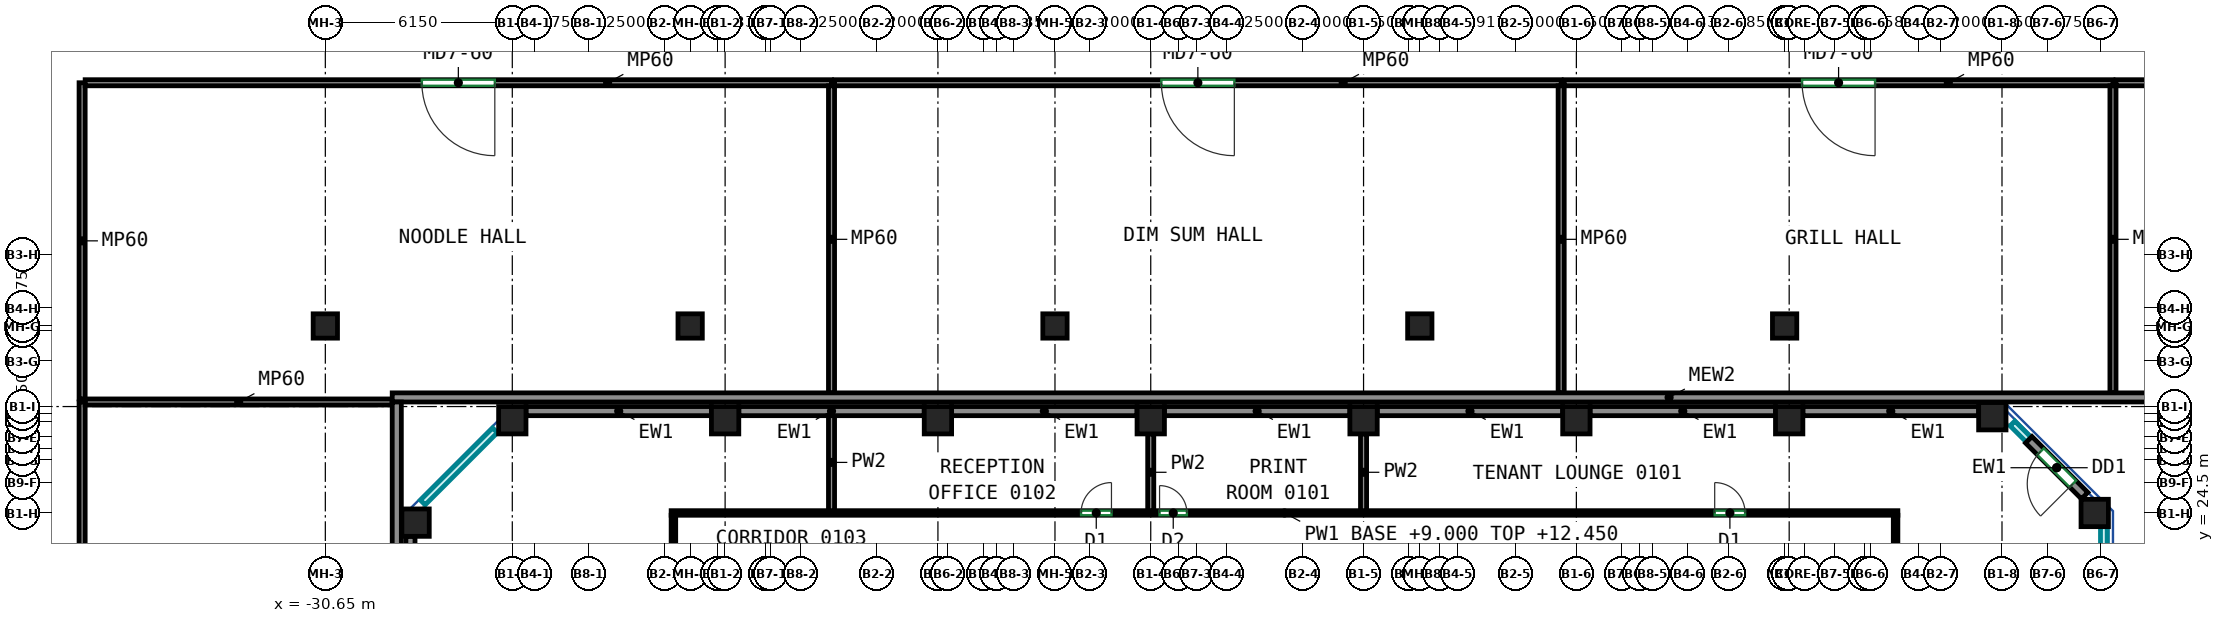
"""IFC4 building model, lengths in metres.
Left out: names, types, materials, properties, quantities, classifications, styles, units other than length and angle.
Written with IfcOpenShell. Run it as: python <this file> out.ifc"""

import sys

from ifc_helpers import new_model, si_unit, direction, frame, frame_2d, origin, origin_2d, place, context, subcontext, project, spatial, rectangle, extrude, source, transform, mapped, element, fill, save


model = new_model("IFC4")
c1 = context("Model", 3, precision=1e-05, world=origin(), true_north=direction((0.0, 1.0)))
c2 = subcontext(c1, "Body", "Model", "MODEL_VIEW")
j1 = project(units=[si_unit("LENGTHUNIT", "METRE"), si_unit("PLANEANGLEUNIT", "RADIAN")], contexts=[c1])
p1 = place(None, origin())
s1 = spatial("IfcSite", under=j1, at=p1, CompositionType="ELEMENT")
p2 = place(p1, origin())
s2 = spatial("IfcBuilding", under=s1, at=p2, CompositionType="ELEMENT")
p3 = place(p2, frame((0.0, 0.0, 9.0)))
s3 = spatial("IfcBuildingStorey", under=s2, at=p3, CompositionType="ELEMENT", Elevation=9.0)
m1 = source(origin(), c2, "Body", "SweptSolid", [
    extrude(rectangle(XDim=0.9, YDim=0.9, at=origin_2d()), origin(), (0.0, 0.0, 1.0), 4.1),
])
for number, where, z_axis, x_axis in (
    (1, (-27.682, 24.182, 0.0), (0.0, 0.0, 1.0), (1.0, 0.0, 0.0)),
    (2, (-24.5, 27.55, 0.0), (0.0, 0.0, 1.0), (1.0, 0.0, 0.0)),
    (3, (-17.5, 27.55, 0.0), (0.0, 0.0, 1.0), (1.0, 0.0, 0.0)),
    (4, (-10.5, 27.55, 0.0), (0.0, 0.0, 1.0), (1.0, 0.0, 0.0)),
    (5, (-3.5, 27.55, 0.0), (0.0, 0.0, 1.0), (1.0, 0.0, 0.0)),
    (6, (3.5, 27.55, 0.0), (0.0, 0.0, 1.0), (1.0, 0.0, 0.0)),
    (7, (10.5, 27.55, 0.0), (0.0, 0.0, 1.0), (1.0, 0.0, 0.0)),
    (8, (17.5, 27.55, 0.0), (0.0, 0.0, 1.0), (1.0, 0.0, 0.0)),
    (9, (24.182, 27.682, 0.0), (0.0, 0.0, 1.0), (1.0, 0.0, 0.0)),
    (10, (27.55, 24.5, 0.0), (0.0, 0.0, 1.0), (1.0, 0.0, 0.0)),
):
    element("IfcColumn", number, at=place(p3, frame(where, z_axis=z_axis, x_axis=x_axis)), inside=s3, PredefinedType="COLUMN", context=c2, shape_type="MappedRepresentation", body=[
        mapped(m1, transform((0.0, 0.0, 0.0))),
    ])
m2 = source(origin(), c2, "Body", "SweptSolid", [
    extrude(rectangle(XDim=0.8, YDim=0.8, at=origin_2d()), origin(), (0.0, 0.0, 1.0), 4.1),
])
for number, where, z_axis, x_axis in (
    (11, (-30.65, 30.65, 0.0), (0.0, 0.0, 1.0), (1.0, 0.0, 0.0)),
    (12, (-18.65, 30.65, 0.0), (0.0, 0.0, 1.0), (1.0, 0.0, 0.0)),
    (13, (-6.65, 30.65, 0.0), (0.0, 0.0, 1.0), (1.0, 0.0, 0.0)),
    (14, (5.35, 30.65, 0.0), (0.0, 0.0, 1.0), (1.0, 0.0, 0.0)),
    (15, (17.35, 30.65, 0.0), (0.0, 0.0, 1.0), (1.0, 0.0, 0.0)),
):
    element("IfcColumn", number, at=place(p3, frame(where, z_axis=z_axis, x_axis=x_axis)), inside=s3, PredefinedType="COLUMN", context=c2, shape_type="MappedRepresentation", body=[
        mapped(m2, transform((0.0, 0.0, 0.0))),
    ])
m3 = source(origin(), c2, "Body", "SweptSolid", [
    extrude(rectangle(XDim=2.6, YDim=0.3, at=frame_2d((1.3, 0.0))), origin(), (0.0, 0.0, 1.0), 4.1),
])
p4 = place(p3, frame((27.219, 25.069, 0.0), z_axis=(0.0, 0.0, 1.0), x_axis=(-0.707059830104, 0.707153729152, 0.0)))
e16 = element("IfcWall", 16, at=p4, inside=s3, PredefinedType="SOLIDWALL", context=c2, shape_type="MappedRepresentation", body=[
    mapped(m3, transform((0.0, 0.0, 0.0))),
])
p5 = place(p4, frame((0.55, 0.0, 0.0)))
e17 = element("IfcOpeningElement", 17, at=p5, cuts=e16, PredefinedType="OPENING", context=c2, shape_type="SweptSolid", body=[
    extrude(rectangle(XDim=1.5, YDim=2.4, at=frame_2d((0.75, 1.2))), frame((0.0, 0.16, 0.0), z_axis=(0.0, -1.0, 0.0), x_axis=(1.0, 0.0, 0.0)), (0.0, 0.0, 1.0), 0.32),
])
m4 = source(origin(), c2, "Body", "SweptSolid", [
    extrude(rectangle(XDim=5.782, YDim=0.3, at=frame_2d((2.891, 0.0))), origin(), (0.0, 0.0, 1.0), 4.1),
])
p6 = place(p3, frame((23.732, 27.85, 0.0), z_axis=(0.0, 0.0, 1.0), x_axis=(-1.0, 0.0, 0.0)))
e18 = element("IfcWall", 18, at=p6, inside=s3, PredefinedType="SOLIDWALL", context=c2, shape_type="MappedRepresentation", body=[
    mapped(m4, transform((0.0, 0.0, 0.0))),
])
m5 = source(origin(), c2, "Body", "SweptSolid", [
    extrude(rectangle(XDim=6.1, YDim=0.3, at=frame_2d((3.05, 0.0))), origin(), (0.0, 0.0, 1.0), 4.1),
])
for number, where, z_axis, x_axis in (
    (19, (17.05, 27.85, 0.0), (0.0, 0.0, 1.0), (-1.0, 0.0, 0.0)),
    (20, (10.05, 27.85, 0.0), (0.0, 0.0, 1.0), (-1.0, 0.0, 0.0)),
    (21, (3.05, 27.85, 0.0), (0.0, 0.0, 1.0), (-1.0, 0.0, 0.0)),
    (22, (-3.95, 27.85, 0.0), (0.0, 0.0, 1.0), (-1.0, 0.0, 0.0)),
    (23, (-10.95, 27.85, 0.0), (0.0, 0.0, 1.0), (-1.0, 0.0, 0.0)),
    (24, (-17.95, 27.85, 0.0), (0.0, 0.0, 1.0), (-1.0, 0.0, 0.0)),
):
    element("IfcWall", number, at=place(p3, frame(where, z_axis=z_axis, x_axis=x_axis)), inside=s3, PredefinedType="SOLIDWALL", context=c2, shape_type="MappedRepresentation", body=[
        mapped(m5, transform((0.0, 0.0, 0.0))),
    ])
m6 = source(origin(), c2, "Body", "SweptSolid", [
    extrude(rectangle(XDim=15.282, YDim=0.3, at=frame_2d((7.641, 0.0))), origin(), (0.0, 0.0, 1.0), 4.1),
])
p7 = place(p3, frame((-27.85, 23.732, 0.0), z_axis=(0.0, 0.0, 1.0), x_axis=(0.0, -1.0, 0.0)))
e25 = element("IfcWall", 25, at=p7, inside=s3, PredefinedType="SOLIDWALL", context=c2, shape_type="MappedRepresentation", body=[
    mapped(m6, transform((0.0, 0.0, 0.0))),
])
m7 = source(origin(), c2, "Body", "SweptSolid", [
    extrude(rectangle(XDim=84.0, YDim=0.3, at=frame_2d((42.0, 0.0))), origin(), (0.0, 0.0, 1.0), 4.1),
])
p8 = place(p3, frame((55.55, 28.3, 0.0), z_axis=(0.0, 0.0, 1.0), x_axis=(-1.0, 0.0, 0.0)))
e26 = element("IfcWall", 26, at=p8, inside=s3, PredefinedType="SOLIDWALL", context=c2, shape_type="MappedRepresentation", body=[
    mapped(m7, transform((0.0, 0.0, 0.0))),
])
m8 = source(origin(), c2, "Body", "SweptSolid", [
    extrude(rectangle(XDim=72.0, YDim=0.3, at=frame_2d((36.0, 0.0))), origin(), (0.0, 0.0, 1.0), 4.1),
])
p9 = place(p3, frame((-28.3, 28.15, 0.0), z_axis=(0.0, 0.0, 1.0), x_axis=(0.0, -1.0, 0.0)))
e27 = element("IfcWall", 27, at=p9, inside=s3, PredefinedType="SOLIDWALL", context=c2, shape_type="MappedRepresentation", body=[
    mapped(m8, transform((0.0, 0.0, 0.0))),
])
p10 = place(p3, frame((-19.2, 8.09, 0.0), z_axis=(0.0, 0.0, 1.0), x_axis=(0.0, 1.0, 0.0)))
e28 = element("IfcWall", 28, at=p10, inside=s3, PredefinedType="PARTITIONING", context=c2, shape_type="SweptSolid", body=[
    extrude(rectangle(XDim=16.335, YDim=0.15, at=frame_2d((8.167, 0.0))), origin(), (0.0, 0.0, 1.0), 4.1),
])
p11 = place(p10, frame((4.41, 0.0, 0.0)))
e29 = element("IfcOpeningElement", 29, at=p11, cuts=e28, PredefinedType="OPENING", context=c2, shape_type="SweptSolid", body=[
    extrude(rectangle(XDim=1.8, YDim=2.1, at=frame_2d((0.9, 1.05))), frame((0.0, 0.085, 0.0), z_axis=(0.0, -1.0, 0.0), x_axis=(1.0, 0.0, 0.0)), (0.0, 0.0, 1.0), 0.17),
])
p12 = place(p3, frame((-19.275, 24.5, 0.0), z_axis=(0.0, 0.0, 1.0), x_axis=(1.0, 0.0, 0.0)))
e30 = element("IfcWall", 30, at=p12, inside=s3, PredefinedType="PARTITIONING", context=c2, shape_type="SweptSolid", body=[
    extrude(rectangle(XDim=40.35, YDim=0.15, at=frame_2d((20.175, 0.0))), origin(), (0.0, 0.0, 1.0), 3.45),
])
p13 = place(p12, frame((13.483, 0.0, 0.0)))
e31 = element("IfcOpeningElement", 31, at=p13, cuts=e30, PredefinedType="OPENING", context=c2, shape_type="SweptSolid", body=[
    extrude(rectangle(XDim=1.0, YDim=2.1, at=frame_2d((0.5, 1.05))), frame((0.0, 0.085, 0.0), z_axis=(0.0, -1.0, 0.0), x_axis=(1.0, 0.0, 0.0)), (0.0, 0.0, 1.0), 0.17),
])
p14 = place(p12, frame((16.065, 0.0, 0.0)))
e32 = element("IfcOpeningElement", 32, at=p14, cuts=e30, PredefinedType="OPENING", context=c2, shape_type="SweptSolid", body=[
    extrude(rectangle(XDim=0.9, YDim=2.1, at=frame_2d((0.45, 1.05))), frame((0.0, 0.085, 0.0), z_axis=(0.0, -1.0, 0.0), x_axis=(1.0, 0.0, 0.0)), (0.0, 0.0, 1.0), 0.17),
])
p15 = place(p12, frame((34.325, 0.0, 0.0)))
e33 = element("IfcOpeningElement", 33, at=p15, cuts=e30, PredefinedType="OPENING", context=c2, shape_type="SweptSolid", body=[
    extrude(rectangle(XDim=1.0, YDim=2.1, at=frame_2d((0.5, 1.05))), frame((0.0, 0.085, 0.0), z_axis=(0.0, -1.0, 0.0), x_axis=(1.0, 0.0, 0.0)), (0.0, 0.0, 1.0), 0.17),
])
p16 = place(p3, frame((21.0, 17.75, 0.0), z_axis=(0.0, 0.0, 1.0), x_axis=(0.0, 1.0, 0.0)))
e34 = element("IfcWall", 34, at=p16, inside=s3, PredefinedType="PARTITIONING", context=c2, shape_type="SweptSolid", body=[
    extrude(rectangle(XDim=6.675, YDim=0.15, at=frame_2d((3.337, 0.0))), origin(), (0.0, 0.0, 1.0), 4.1),
])
p17 = place(p3, frame((-14.0, 24.576, 0.0), z_axis=(0.0, 0.0, 1.0), x_axis=(0.0, 1.0, 0.0)))
e35 = element("IfcWall", 35, at=p17, inside=s3, PredefinedType="PARTITIONING", context=c2, shape_type="SweptSolid", body=[
    extrude(rectangle(XDim=3.174, YDim=0.2, at=frame_2d((1.587, 0.0))), origin(), (0.0, 0.0, 1.0), 4.1),
])
for number, where, z_axis, x_axis in (
    (36, (-3.5, 24.576, 0.0), (0.0, 0.0, 1.0), (0.0, 1.0, 0.0)),
    (37, (3.5, 24.576, 0.0), (0.0, 0.0, 1.0), (0.0, 1.0, 0.0)),
):
    element("IfcWall", number, at=place(p3, frame(where, z_axis=z_axis, x_axis=x_axis)), inside=s3, PredefinedType="PARTITIONING", context=c2, shape_type="SweptSolid", body=[
        extrude(rectangle(XDim=2.524, YDim=0.2, at=frame_2d((1.262, 0.0))), origin(), (0.0, 0.0, 1.0), 4.1),
    ])
m9 = source(origin(), c2, "Body", "SweptSolid", [
    extrude(rectangle(XDim=18.05, YDim=0.2, at=frame_2d((9.025, 0.0))), origin(), (0.0, 0.0, 1.0), 3.2),
])
p18 = place(p3, frame((-38.65, 28.15, 0.0), z_axis=(0.0, 0.0, 1.0), x_axis=(0.0, -1.0, 0.0)))
e38 = element("IfcWall", 38, at=p18, inside=s3, PredefinedType="PARTITIONING", context=c2, shape_type="MappedRepresentation", body=[
    mapped(m9, transform((0.0, 0.0, 0.0))),
])
p19 = place(p18, frame((7.825, 0.0, 0.0)))
e39 = element("IfcOpeningElement", 39, at=p19, cuts=e38, PredefinedType="OPENING", context=c2, shape_type="SweptSolid", body=[
    extrude(rectangle(XDim=2.4, YDim=2.4, at=frame_2d((1.2, 1.2))), frame((0.0, 0.11, 0.0), z_axis=(0.0, -1.0, 0.0), x_axis=(1.0, 0.0, 0.0)), (0.0, 0.0, 1.0), 0.22),
])
m10 = source(origin(), c2, "Body", "SweptSolid", [
    extrude(rectangle(XDim=10.1, YDim=0.2, at=frame_2d((5.05, 0.0))), origin(), (0.0, 0.0, 1.0), 3.2),
])
p20 = place(p3, frame((-38.55, 28.15, 0.0), z_axis=(0.0, 0.0, 1.0), x_axis=(1.0, 0.0, 0.0)))
e40 = element("IfcWall", 40, at=p20, inside=s3, PredefinedType="PARTITIONING", context=c2, shape_type="MappedRepresentation", body=[
    mapped(m10, transform((0.0, 0.0, 0.0))),
])
m11 = source(origin(), c2, "Body", "SweptSolid", [
    extrude(rectangle(XDim=10.4, YDim=0.2, at=frame_2d((5.2, 0.0))), origin(), (0.0, 0.0, 1.0), 3.2),
])
p21 = place(p3, frame((-38.65, 38.65, 0.0), z_axis=(0.0, 0.0, 1.0), x_axis=(0.0, -1.0, 0.0)))
e41 = element("IfcWall", 41, at=p21, inside=s3, PredefinedType="PARTITIONING", context=c2, shape_type="MappedRepresentation", body=[
    mapped(m11, transform((0.0, 0.0, 0.0))),
])
m12 = source(origin(), c2, "Body", "SweptSolid", [
    extrude(rectangle(XDim=24.55, YDim=0.2, at=frame_2d((12.275, 0.0))), origin(), (0.0, 0.0, 1.0), 3.2),
])
p22 = place(p3, frame((-14.0, 38.65, 0.0), z_axis=(0.0, 0.0, 1.0), x_axis=(-1.0, 0.0, 0.0)))
e42 = element("IfcWall", 42, at=p22, inside=s3, PredefinedType="PARTITIONING", context=c2, shape_type="MappedRepresentation", body=[
    mapped(m12, transform((0.0, 0.0, 0.0))),
])
p23 = place(p22, frame((11.075, 0.0, 0.0)))
e43 = element("IfcOpeningElement", 43, at=p23, cuts=e42, PredefinedType="OPENING", context=c2, shape_type="SweptSolid", body=[
    extrude(rectangle(XDim=2.4, YDim=2.4, at=frame_2d((1.2, 1.2))), frame((0.0, 0.11, 0.0), z_axis=(0.0, -1.0, 0.0), x_axis=(1.0, 0.0, 0.0)), (0.0, 0.0, 1.0), 0.22),
])
p24 = place(p3, frame((-14.0, 38.55, 0.0), z_axis=(0.0, 0.0, 1.0), x_axis=(0.0, -1.0, 0.0)))
e44 = element("IfcWall", 44, at=p24, inside=s3, PredefinedType="PARTITIONING", context=c2, shape_type="MappedRepresentation", body=[
    mapped(m10, transform((0.0, 0.0, 0.0))),
])
m13 = source(origin(), c2, "Body", "SweptSolid", [
    extrude(rectangle(XDim=23.9, YDim=0.2, at=frame_2d((11.95, 0.0))), origin(), (0.0, 0.0, 1.0), 3.2),
])
p25 = place(p3, frame((10.0, 38.65, 0.0), z_axis=(0.0, 0.0, 1.0), x_axis=(-1.0, 0.0, 0.0)))
e45 = element("IfcWall", 45, at=p25, inside=s3, PredefinedType="PARTITIONING", context=c2, shape_type="MappedRepresentation", body=[
    mapped(m13, transform((0.0, 0.0, 0.0))),
])
p26 = place(p25, frame((10.75, 0.0, 0.0)))
e46 = element("IfcOpeningElement", 46, at=p26, cuts=e45, PredefinedType="OPENING", context=c2, shape_type="SweptSolid", body=[
    extrude(rectangle(XDim=2.4, YDim=2.4, at=frame_2d((1.2, 1.2))), frame((0.0, 0.11, 0.0), z_axis=(0.0, -1.0, 0.0), x_axis=(1.0, 0.0, 0.0)), (0.0, 0.0, 1.0), 0.22),
])
p27 = place(p3, frame((10.0, 38.55, 0.0), z_axis=(0.0, 0.0, 1.0), x_axis=(0.0, -1.0, 0.0)))
e47 = element("IfcWall", 47, at=p27, inside=s3, PredefinedType="PARTITIONING", context=c2, shape_type="MappedRepresentation", body=[
    mapped(m10, transform((0.0, 0.0, 0.0))),
])
p28 = place(p3, frame((28.15, 38.65, 0.0), z_axis=(0.0, 0.0, 1.0), x_axis=(-1.0, 0.0, 0.0)))
e48 = element("IfcWall", 48, at=p28, inside=s3, PredefinedType="PARTITIONING", context=c2, shape_type="MappedRepresentation", body=[
    mapped(m9, transform((0.0, 0.0, 0.0))),
])
p29 = place(p28, frame((7.825, 0.0, 0.0)))
e49 = element("IfcOpeningElement", 49, at=p29, cuts=e48, PredefinedType="OPENING", context=c2, shape_type="SweptSolid", body=[
    extrude(rectangle(XDim=2.4, YDim=2.4, at=frame_2d((1.2, 1.2))), frame((0.0, 0.11, 0.0), z_axis=(0.0, -1.0, 0.0), x_axis=(1.0, 0.0, 0.0)), (0.0, 0.0, 1.0), 0.22),
])
p30 = place(p3, frame((28.15, 38.55, 0.0), z_axis=(0.0, 0.0, 1.0), x_axis=(0.0, -1.0, 0.0)))
e50 = element("IfcWall", 50, at=p30, inside=s3, PredefinedType="PARTITIONING", context=c2, shape_type="MappedRepresentation", body=[
    mapped(m10, transform((0.0, 0.0, 0.0))),
])
m14 = source(origin(), c2, "Body", "SweptSolid", [
    extrude(rectangle(XDim=27.3, YDim=0.2, at=frame_2d((13.65, 0.0))), origin(), (0.0, 0.0, 1.0), 3.2),
])
p31 = place(p3, frame((55.55, 38.65, 0.0), z_axis=(0.0, 0.0, 1.0), x_axis=(-1.0, 0.0, 0.0)))
e51 = element("IfcWall", 51, at=p31, inside=s3, PredefinedType="PARTITIONING", context=c2, shape_type="MappedRepresentation", body=[
    mapped(m14, transform((0.0, 0.0, 0.0))),
])
p32 = place(p31, frame((12.45, 0.0, 0.0)))
e52 = element("IfcOpeningElement", 52, at=p32, cuts=e51, PredefinedType="OPENING", context=c2, shape_type="SweptSolid", body=[
    extrude(rectangle(XDim=2.4, YDim=2.4, at=frame_2d((1.2, 1.2))), frame((0.0, 0.11, 0.0), z_axis=(0.0, -1.0, 0.0), x_axis=(1.0, 0.0, 0.0)), (0.0, 0.0, 1.0), 0.22),
])
p33 = place(p5, origin())
e53 = element("IfcDoor", 53, at=p33, inside=s3, OperationType="DOUBLE_DOOR_SINGLE_SWING", PredefinedType="DOOR", context=c2, shape_type="SweptSolid", body=[
    extrude(rectangle(XDim=1.5, YDim=2.4, at=frame_2d((0.75, 1.2))), frame((0.0, 0.025, 0.0), z_axis=(0.0, -1.0, 0.0), x_axis=(1.0, 0.0, 0.0)), (0.0, 0.0, 1.0), 0.05),
])
fill(e17, e53)
p34 = place(p13, origin())
e54 = element("IfcDoor", 54, at=p34, inside=s3, OperationType="SINGLE_SWING_RIGHT", PredefinedType="DOOR", context=c2, shape_type="SweptSolid", body=[
    extrude(rectangle(XDim=1.0, YDim=2.1, at=frame_2d((0.5, 1.05))), frame((0.0, 0.025, 0.0), z_axis=(0.0, -1.0, 0.0), x_axis=(1.0, 0.0, 0.0)), (0.0, 0.0, 1.0), 0.05),
])
fill(e31, e54)
p35 = place(p14, origin())
e55 = element("IfcDoor", 55, at=p35, inside=s3, OperationType="SINGLE_SWING_LEFT", PredefinedType="DOOR", context=c2, shape_type="SweptSolid", body=[
    extrude(rectangle(XDim=0.9, YDim=2.1, at=frame_2d((0.45, 1.05))), frame((0.0, 0.025, 0.0), z_axis=(0.0, -1.0, 0.0), x_axis=(1.0, 0.0, 0.0)), (0.0, 0.0, 1.0), 0.05),
])
fill(e32, e55)
p36 = place(p15, origin())
e56 = element("IfcDoor", 56, at=p36, inside=s3, OperationType="SINGLE_SWING_LEFT", PredefinedType="DOOR", context=c2, shape_type="SweptSolid", body=[
    extrude(rectangle(XDim=1.0, YDim=2.1, at=frame_2d((0.5, 1.05))), frame((0.0, 0.025, 0.0), z_axis=(0.0, -1.0, 0.0), x_axis=(1.0, 0.0, 0.0)), (0.0, 0.0, 1.0), 0.05),
])
fill(e33, e56)
p37 = place(p23, origin())
e57 = element("IfcDoor", 57, at=p37, inside=s3, OperationType="DOUBLE_DOOR_SINGLE_SWING", PredefinedType="DOOR", context=c2, shape_type="SweptSolid", body=[
    extrude(rectangle(XDim=2.4, YDim=2.4, at=frame_2d((1.2, 1.2))), frame((0.0, 0.025, 0.0), z_axis=(0.0, -1.0, 0.0), x_axis=(1.0, 0.0, 0.0)), (0.0, 0.0, 1.0), 0.05),
])
fill(e43, e57)
p38 = place(p26, origin())
e58 = element("IfcDoor", 58, at=p38, inside=s3, OperationType="DOUBLE_DOOR_SINGLE_SWING", PredefinedType="DOOR", context=c2, shape_type="SweptSolid", body=[
    extrude(rectangle(XDim=2.4, YDim=2.4, at=frame_2d((1.2, 1.2))), frame((0.0, 0.025, 0.0), z_axis=(0.0, -1.0, 0.0), x_axis=(1.0, 0.0, 0.0)), (0.0, 0.0, 1.0), 0.05),
])
fill(e46, e58)
p39 = place(p29, origin())
e59 = element("IfcDoor", 59, at=p39, inside=s3, OperationType="DOUBLE_DOOR_SINGLE_SWING", PredefinedType="DOOR", context=c2, shape_type="SweptSolid", body=[
    extrude(rectangle(XDim=2.4, YDim=2.4, at=frame_2d((1.2, 1.2))), frame((0.0, 0.025, 0.0), z_axis=(0.0, -1.0, 0.0), x_axis=(1.0, 0.0, 0.0)), (0.0, 0.0, 1.0), 0.05),
])
fill(e49, e59)
save(model, sys.argv[1])
